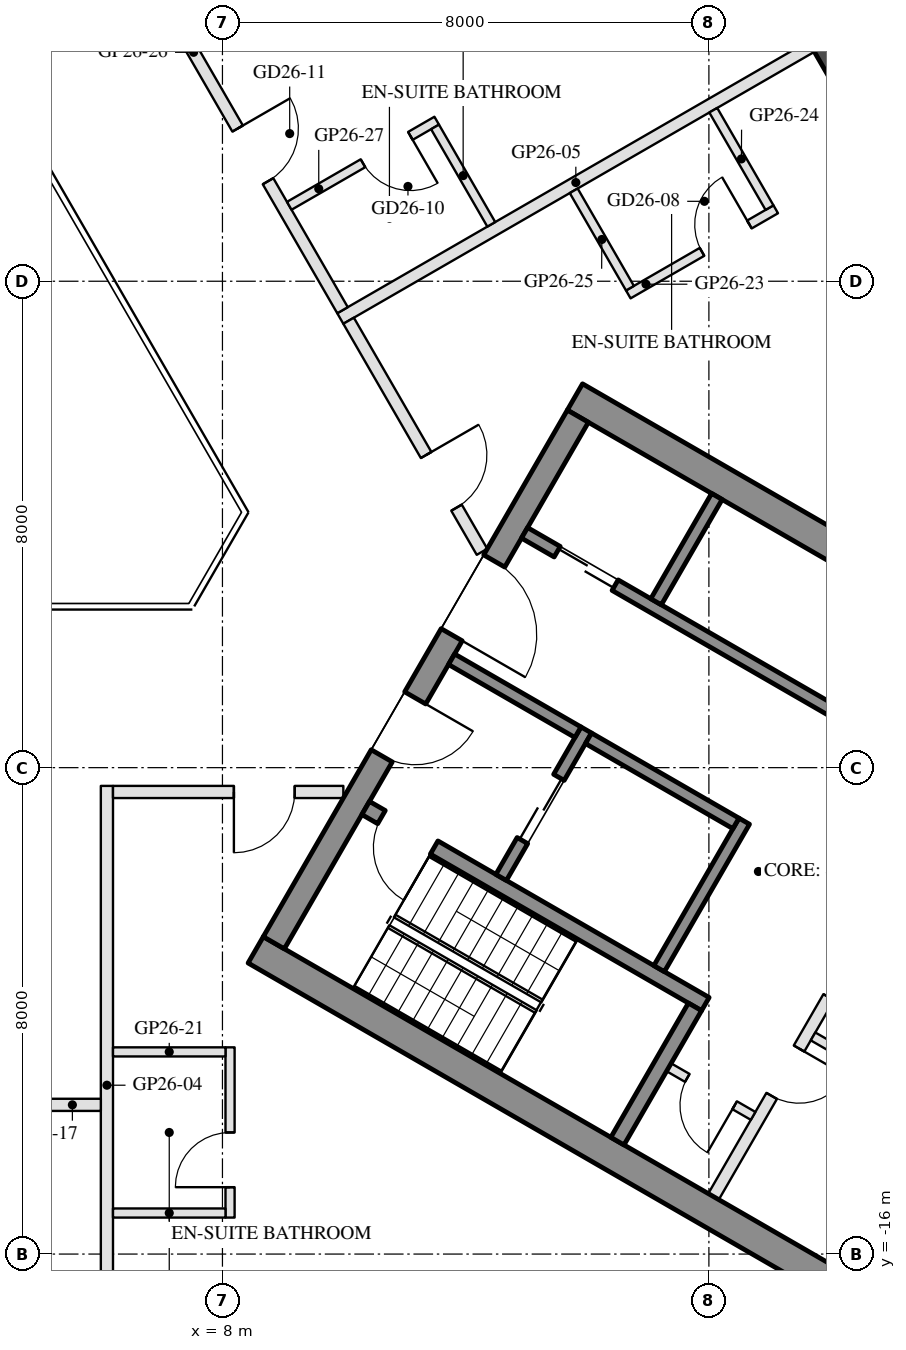
"""IFC4 building model, lengths in metres.
Left out: names, types, materials, properties, quantities, classifications, styles, units other than length and angle.
Written with IfcOpenShell. Run it as: python <this file> out.ifc"""

import sys

from ifc_helpers import new_model, si_unit, direction, frame, frame_2d, origin, place, context, subcontext, project, spatial, rectangle, extrude, element, fill, save


model = new_model("IFC4")
c1 = context("Model", 3, precision=1e-05, world=origin(), true_north=direction((0.0, 1.0)))
c2 = subcontext(c1, "Body", "Model", "MODEL_VIEW")
j1 = project(units=[si_unit("LENGTHUNIT", "METRE"), si_unit("PLANEANGLEUNIT", "RADIAN")], contexts=[c1])
p1 = place(None, origin())
s1 = spatial("IfcSite", under=j1, at=p1, CompositionType="ELEMENT")
p2 = place(p1, origin())
s2 = spatial("IfcBuilding", under=s1, at=p2, CompositionType="ELEMENT")
p3 = place(p2, frame((0.0, 0.0, 272.6)))
s3 = spatial("IfcBuildingStorey", under=s2, at=p3, CompositionType="ELEMENT", Elevation=272.6)
p4 = place(p3, frame((18.519, 2.766, 0.0), z_axis=(0.0, 0.0, 1.0), x_axis=(-0.499995993298, 0.866027717042, 0.0)))
e1 = element("IfcWall", 1, at=p4, inside=s3, PredefinedType="SOLIDWALL", context=c2, shape_type="SweptSolid", body=[
    extrude(rectangle(XDim=6.284, YDim=0.35, at=frame_2d((3.142, 0.0))), origin(), (0.0, 0.0, 1.0), 3.55),
])
p5 = place(p4, frame((1.813, 0.0, 0.0)))
e2 = element("IfcOpeningElement", 2, at=p5, cuts=e1, PredefinedType="OPENING", context=c2, shape_type="SweptSolid", body=[
    extrude(rectangle(XDim=2.4, YDim=2.4, at=frame_2d((1.2, 1.2))), frame((0.0, 0.185, 0.0), z_axis=(0.0, -1.0, 0.0), x_axis=(1.0, 0.0, 0.0)), (0.0, 0.0, 1.0), 0.37),
])
p6 = place(p4, frame((4.513, 0.0, 0.3)))
e3 = element("IfcOpeningElement", 3, at=p6, cuts=e1, PredefinedType="OPENING", context=c2, shape_type="SweptSolid", body=[
    extrude(rectangle(XDim=1.4, YDim=2.65, at=frame_2d((0.7, 1.325))), frame((0.0, 0.185, 0.0), z_axis=(0.0, -1.0, 0.0), x_axis=(1.0, 0.0, 0.0)), (0.0, 0.0, 1.0), 0.37),
])
for number, where, z_axis, x_axis in (
    (4, (8.547, -10.997, 0.0), (0.0, 0.0, 1.0), (0.866, -0.5, 0.0)),
    (5, (13.797, -1.903, 0.0), (0.0, 0.0, 1.0), (0.866, -0.5, 0.0)),
):
    element("IfcWall", number, at=place(p3, frame(where, z_axis=z_axis, x_axis=x_axis)), inside=s3, PredefinedType="SHEAR", context=c2, shape_type="SweptSolid", body=[
        extrude(rectangle(XDim=13.031, YDim=0.5, at=frame_2d((6.516, 0.0))), origin(), (0.0, 0.0, 1.0), 3.5),
    ])
p7 = place(p3, frame((8.845, -10.88, 0.0), z_axis=(0.0, 0.0, 1.0), x_axis=(0.500004234368, 0.866022959057, 0.0)))
e6 = element("IfcWall", 6, at=p7, inside=s3, PredefinedType="SHEAR", context=c2, shape_type="SweptSolid", body=[
    extrude(rectangle(XDim=10.0, YDim=0.4, at=frame_2d((5.0, 0.0))), origin(), (0.0, 0.0, 1.0), 3.5),
])
p8 = place(p7, frame((3.55, 0.0, 0.0)))
e7 = element("IfcOpeningElement", 7, at=p8, cuts=e6, PredefinedType="OPENING", context=c2, shape_type="SweptSolid", body=[
    extrude(rectangle(XDim=1.1, YDim=2.1, at=frame_2d((0.55, 1.05))), frame((0.0, 0.21, 0.0), z_axis=(0.0, -1.0, 0.0), x_axis=(1.0, 0.0, 0.0)), (0.0, 0.0, 1.0), 0.42),
])
p9 = place(p7, frame((5.85, 0.0, 0.0)))
e8 = element("IfcOpeningElement", 8, at=p9, cuts=e6, PredefinedType="OPENING", context=c2, shape_type="SweptSolid", body=[
    extrude(rectangle(XDim=1.4, YDim=2.1, at=frame_2d((0.7, 1.05))), frame((0.0, 0.21, 0.0), z_axis=(0.0, -1.0, 0.0), x_axis=(1.0, 0.0, 0.0)), (0.0, 0.0, 1.0), 0.42),
])
p10 = place(p3, frame((10.356, -8.664, 0.0), z_axis=(0.0, 0.0, 1.0), x_axis=(0.866028629588, -0.499994412703, 0.0)))
e9 = element("IfcWall", 9, at=p10, inside=s3, PredefinedType="SHEAR", context=c2, shape_type="SweptSolid", body=[
    extrude(rectangle(XDim=6.45, YDim=0.25, at=frame_2d((3.225, 0.0))), origin(), (0.0, 0.0, 1.0), 3.5),
])
p11 = place(p10, frame((0.3, 0.0, 0.0)))
e10 = element("IfcOpeningElement", 10, at=p11, cuts=e9, PredefinedType="OPENING", context=c2, shape_type="SweptSolid", body=[
    extrude(rectangle(XDim=1.0, YDim=2.1, at=frame_2d((0.5, 1.05))), frame((0.0, 0.135, 0.0), z_axis=(0.0, -1.0, 0.0), x_axis=(1.0, 0.0, 0.0)), (0.0, 0.0, 1.0), 0.27),
])
p12 = place(p3, frame((14.496, -14.143, 0.0), z_axis=(0.0, 0.0, 1.0), x_axis=(0.500062241894, 0.865989465428, 0.0)))
e11 = element("IfcWall", 11, at=p12, inside=s3, PredefinedType="SHEAR", context=c2, shape_type="SweptSolid", body=[
    extrude(rectangle(XDim=2.55, YDim=0.25, at=frame_2d((1.275, 0.0))), origin(), (0.0, 0.0, 1.0), 3.5),
])
p13 = place(p3, frame((15.181, -11.305, 0.0), z_axis=(0.0, 0.0, 1.0), x_axis=(0.49994636267, 0.866056369097, 0.0)))
e12 = element("IfcWall", 12, at=p13, inside=s3, PredefinedType="SHEAR", context=c2, shape_type="SweptSolid", body=[
    extrude(rectangle(XDim=2.8, YDim=0.2, at=frame_2d((1.4, 0.0))), origin(), (0.0, 0.0, 1.0), 3.5),
])
p14 = place(p3, frame((12.583, -9.805, 0.0), z_axis=(0.0, 0.0, 1.0), x_axis=(0.49994636267, 0.866056369097, 0.0)))
e13 = element("IfcWall", 13, at=p14, inside=s3, PredefinedType="SHEAR", context=c2, shape_type="SweptSolid", body=[
    extrude(rectangle(XDim=2.8, YDim=0.2, at=frame_2d((1.4, 0.0))), origin(), (0.0, 0.0, 1.0), 3.5),
])
p15 = place(p14, frame((0.7, 0.0, 0.0)))
e14 = element("IfcOpeningElement", 14, at=p15, cuts=e13, PredefinedType="OPENING", context=c2, shape_type="SweptSolid", body=[
    extrude(rectangle(XDim=1.2, YDim=2.1, at=frame_2d((0.6, 1.05))), frame((0.0, 0.11, 0.0), z_axis=(0.0, -1.0, 0.0), x_axis=(1.0, 0.0, 0.0)), (0.0, 0.0, 1.0), 0.22),
])
p16 = place(p3, frame((11.768, -6.217, 0.0), z_axis=(0.0, 0.0, 1.0), x_axis=(0.866050077142, -0.499957262057, 0.0)))
e15 = element("IfcWall", 15, at=p16, inside=s3, PredefinedType="SHEAR", context=c2, shape_type="SweptSolid", body=[
    extrude(rectangle(XDim=2.4, YDim=0.2, at=frame_2d((1.2, 0.0))), origin(), (0.0, 0.0, 1.0), 3.5),
])
p17 = place(p3, frame((14.02, -7.517, 0.0), z_axis=(0.0, 0.0, 1.0), x_axis=(0.866034573852, -0.49998411664, 0.0)))
e16 = element("IfcWall", 16, at=p17, inside=s3, PredefinedType="SHEAR", context=c2, shape_type="SweptSolid", body=[
    extrude(rectangle(XDim=2.8, YDim=0.2, at=frame_2d((1.4, 0.0))), origin(), (0.0, 0.0, 1.0), 3.5),
])
p18 = place(p3, frame((12.968, -4.138, 0.0), z_axis=(0.0, 0.0, 1.0), x_axis=(0.866028328073, -0.49999493495, 0.0)))
e17 = element("IfcWall", 17, at=p18, inside=s3, PredefinedType="SHEAR", context=c2, shape_type="SweptSolid", body=[
    extrude(rectangle(XDim=10.16, YDim=0.2, at=frame_2d((5.08, 0.0))), origin(), (0.0, 0.0, 1.0), 3.5),
])
p19 = place(p18, frame((0.62, 0.0, 0.0)))
e18 = element("IfcOpeningElement", 18, at=p19, cuts=e17, PredefinedType="OPENING", context=c2, shape_type="SweptSolid", body=[
    extrude(rectangle(XDim=1.1, YDim=2.1, at=frame_2d((0.55, 1.05))), frame((0.0, 0.11, 0.0), z_axis=(0.0, -1.0, 0.0), x_axis=(1.0, 0.0, 0.0)), (0.0, 0.0, 1.0), 0.22),
])
p20 = place(p18, frame((5.8, 0.0, 0.0)))
e19 = element("IfcOpeningElement", 19, at=p20, cuts=e17, PredefinedType="OPENING", context=c2, shape_type="SweptSolid", body=[
    extrude(rectangle(XDim=0.9, YDim=2.1, at=frame_2d((0.45, 1.05))), frame((0.0, 0.11, 0.0), z_axis=(0.0, -1.0, 0.0), x_axis=(1.0, 0.0, 0.0)), (0.0, 0.0, 1.0), 0.22),
])
p21 = place(p3, frame((15.131, -5.272, 0.0), z_axis=(0.0, 0.0, 1.0), x_axis=(0.499972520799, 0.866041268327, 0.0)))
e20 = element("IfcWall", 20, at=p21, inside=s3, PredefinedType="SHEAR", context=c2, shape_type="SweptSolid", body=[
    extrude(rectangle(XDim=2.0, YDim=0.2, at=frame_2d((1.0, 0.0))), origin(), (0.0, 0.0, 1.0), 3.5),
])
p22 = place(p3, frame((16.076, -15.055, 0.0), z_axis=(0.0, 0.0, 1.0), x_axis=(0.499995103361, 0.866028230842, 0.0)))
e21 = element("IfcWall", 21, at=p22, inside=s3, PredefinedType="PARTITIONING", context=c2, shape_type="SweptSolid", body=[
    extrude(rectangle(XDim=5.4, YDim=0.2, at=frame_2d((2.7, 0.0))), origin(), (0.0, 0.0, 1.0), 3.5),
])
p23 = place(p22, frame((1.913, 0.0, 0.0)))
e22 = element("IfcOpeningElement", 22, at=p23, cuts=e21, PredefinedType="OPENING", context=c2, shape_type="SweptSolid", body=[
    extrude(rectangle(XDim=0.9, YDim=2.1, at=frame_2d((0.45, 1.05))), frame((0.0, 0.11, 0.0), z_axis=(0.0, -1.0, 0.0), x_axis=(1.0, 0.0, 0.0)), (0.0, 0.0, 1.0), 0.22),
])
p24 = place(p22, frame((3.788, 0.0, 0.0)))
e23 = element("IfcOpeningElement", 23, at=p24, cuts=e21, PredefinedType="OPENING", context=c2, shape_type="SweptSolid", body=[
    extrude(rectangle(XDim=0.9, YDim=2.1, at=frame_2d((0.45, 1.05))), frame((0.0, 0.11, 0.0), z_axis=(0.0, -1.0, 0.0), x_axis=(1.0, 0.0, 0.0)), (0.0, 0.0, 1.0), 0.22),
])
p25 = place(p3, frame((15.342, -12.928, 0.0), z_axis=(0.0, 0.0, 1.0), x_axis=(0.865989903783, -0.500061482766, 0.0)))
e24 = element("IfcWall", 24, at=p25, inside=s3, PredefinedType="PARTITIONING", context=c2, shape_type="SweptSolid", body=[
    extrude(rectangle(XDim=1.6, YDim=0.15, at=frame_2d((0.8, 0.0))), origin(), (0.0, 0.0, 1.0), 3.5),
])
p26 = place(p25, frame((0.35, 0.0, 0.0)))
e25 = element("IfcOpeningElement", 25, at=p26, cuts=e24, PredefinedType="OPENING", context=c2, shape_type="SweptSolid", body=[
    extrude(rectangle(XDim=0.9, YDim=2.1, at=frame_2d((0.45, 1.05))), frame((0.0, 0.085, 0.0), z_axis=(0.0, -1.0, 0.0), x_axis=(1.0, 0.0, 0.0)), (0.0, 0.0, 1.0), 0.17),
])
p27 = place(p3, frame((17.713, -12.42, 0.0), z_axis=(0.0, 0.0, 1.0), x_axis=(0.866028878405, -0.499993981732, 0.0)))
e26 = element("IfcWall", 26, at=p27, inside=s3, PredefinedType="PARTITIONING", context=c2, shape_type="SweptSolid", body=[
    extrude(rectangle(XDim=5.292, YDim=0.15, at=frame_2d((2.646, 0.0))), origin(), (0.0, 0.0, 1.0), 3.5),
])
p28 = place(p3, frame((6.1, -18.146, 0.0), z_axis=(0.0, 0.0, 1.0), x_axis=(0.0, 1.0, 0.0)))
e27 = element("IfcWall", 27, at=p28, inside=s3, PredefinedType="PARTITIONING", context=c2, shape_type="SweptSolid", body=[
    extrude(rectangle(XDim=9.846, YDim=0.2, at=frame_2d((4.923, 0.0))), origin(), (0.0, 0.0, 1.0), 3.1),
])
p29 = place(p3, frame((17.685, 3.86, 0.0), z_axis=(0.0, 0.0, 1.0), x_axis=(-0.866026066645, -0.499998851889, 0.0)))
e28 = element("IfcWall", 28, at=p29, inside=s3, PredefinedType="PARTITIONING", context=c2, shape_type="SweptSolid", body=[
    extrude(rectangle(XDim=8.946, YDim=0.2, at=frame_2d((4.473, 0.0))), origin(), (0.0, 0.0, 1.0), 3.1),
])
p30 = place(p3, frame((6.0, -13.546, 0.0), z_axis=(0.0, 0.0, 1.0), x_axis=(-1.0, 0.0, 0.0)))
e29 = element("IfcWall", 29, at=p30, inside=s3, PredefinedType="PARTITIONING", context=c2, shape_type="SweptSolid", body=[
    extrude(rectangle(XDim=3.9, YDim=0.2, at=frame_2d((1.95, 0.0))), origin(), (0.0, 0.0, 1.0), 3.0),
])
p31 = place(p30, frame((1.45, 0.0, 0.0)))
e30 = element("IfcOpeningElement", 30, at=p31, cuts=e29, PredefinedType="OPENING", context=c2, shape_type="SweptSolid", body=[
    extrude(rectangle(XDim=1.0, YDim=2.1, at=frame_2d((0.5, 1.05))), frame((0.0, 0.11, 0.0), z_axis=(0.0, -1.0, 0.0), x_axis=(1.0, 0.0, 0.0)), (0.0, 0.0, 1.0), 0.22),
])
p32 = place(p3, frame((9.988, -8.4, 0.0), z_axis=(0.0, 0.0, 1.0), x_axis=(-1.0, 0.0, 0.0)))
e31 = element("IfcWall", 31, at=p32, inside=s3, PredefinedType="PARTITIONING", context=c2, shape_type="SweptSolid", body=[
    extrude(rectangle(XDim=3.788, YDim=0.2, at=frame_2d((1.894, 0.0))), origin(), (0.0, 0.0, 1.0), 3.0),
])
p33 = place(p32, frame((0.8, 0.0, 0.0)))
e32 = element("IfcOpeningElement", 32, at=p33, cuts=e31, PredefinedType="OPENING", context=c2, shape_type="SweptSolid", body=[
    extrude(rectangle(XDim=1.0, YDim=2.1, at=frame_2d((0.5, 1.05))), frame((0.0, 0.11, 0.0), z_axis=(0.0, -1.0, 0.0), x_axis=(1.0, 0.0, 0.0)), (0.0, 0.0, 1.0), 0.22),
])
p34 = place(p3, frame((8.125, -15.4, 0.0), z_axis=(0.0, 0.0, 1.0), x_axis=(0.0, 1.0, 0.0)))
e33 = element("IfcWall", 33, at=p34, inside=s3, PredefinedType="PARTITIONING", context=c2, shape_type="SweptSolid", body=[
    extrude(rectangle(XDim=2.8, YDim=0.15, at=frame_2d((1.4, 0.0))), origin(), (0.0, 0.0, 1.0), 3.55),
])
p35 = place(p34, frame((0.5, 0.0, 0.0)))
e34 = element("IfcOpeningElement", 34, at=p35, cuts=e33, PredefinedType="OPENING", context=c2, shape_type="SweptSolid", body=[
    extrude(rectangle(XDim=0.9, YDim=2.1, at=frame_2d((0.45, 1.05))), frame((0.0, 0.085, 0.0), z_axis=(0.0, -1.0, 0.0), x_axis=(1.0, 0.0, 0.0)), (0.0, 0.0, 1.0), 0.17),
])
for number, where, z_axis, x_axis in (
    (35, (6.2, -15.325, 0.0), (0.0, 0.0, 1.0), (1.0, 0.0, 0.0)),
    (36, (6.2, -12.675, 0.0), (0.0, 0.0, 1.0), (1.0, 0.0, 0.0)),
):
    element("IfcWall", number, at=place(p3, frame(where, z_axis=z_axis, x_axis=x_axis)), inside=s3, PredefinedType="PARTITIONING", context=c2, shape_type="SweptSolid", body=[
        extrude(rectangle(XDim=1.85, YDim=0.15, at=frame_2d((0.925, 0.0))), origin(), (0.0, 0.0, 1.0), 3.0),
    ])
p36 = place(p3, frame((10.075, -0.65, 0.0), z_axis=(0.0, 0.0, 1.0), x_axis=(0.499998569178, -0.866026229868, 0.0)))
e37 = element("IfcWall", 37, at=p36, inside=s3, PredefinedType="PARTITIONING", context=c2, shape_type="SweptSolid", body=[
    extrude(rectangle(XDim=4.388, YDim=0.2, at=frame_2d((2.194, 0.0))), origin(), (0.0, 0.0, 1.0), 3.0),
])
p37 = place(p36, frame((2.55, 0.0, 0.0)))
e38 = element("IfcOpeningElement", 38, at=p37, cuts=e37, PredefinedType="OPENING", context=c2, shape_type="SweptSolid", body=[
    extrude(rectangle(XDim=1.0, YDim=2.1, at=frame_2d((0.5, 1.05))), frame((0.0, 0.11, 0.0), z_axis=(0.0, -1.0, 0.0), x_axis=(1.0, 0.0, 0.0)), (0.0, 0.0, 1.0), 0.22),
])
p38 = place(p3, frame((14.674, -0.217, 0.0), z_axis=(0.0, 0.0, 1.0), x_axis=(0.866056369097, 0.49994636267, 0.0)))
e39 = element("IfcWall", 39, at=p38, inside=s3, PredefinedType="PARTITIONING", context=c2, shape_type="SweptSolid", body=[
    extrude(rectangle(XDim=2.8, YDim=0.15, at=frame_2d((1.4, 0.0))), origin(), (0.0, 0.0, 1.0), 3.0),
])
p39 = place(p38, frame((1.4, 0.0, 0.0)))
e40 = element("IfcOpeningElement", 40, at=p39, cuts=e39, PredefinedType="OPENING", context=c2, shape_type="SweptSolid", body=[
    extrude(rectangle(XDim=0.9, YDim=2.1, at=frame_2d((0.45, 1.05))), frame((0.0, 0.085, 0.0), z_axis=(0.0, -1.0, 0.0), x_axis=(1.0, 0.0, 0.0)), (0.0, 0.0, 1.0), 0.17),
])
p40 = place(p3, frame((16.997, 1.211, 0.0), z_axis=(0.0, 0.0, 1.0), x_axis=(-0.500042316284, 0.866000971088, 0.0)))
e41 = element("IfcWall", 41, at=p40, inside=s3, PredefinedType="PARTITIONING", context=c2, shape_type="SweptSolid", body=[
    extrude(rectangle(XDim=1.85, YDim=0.15, at=frame_2d((0.925, 0.0))), origin(), (0.0, 0.0, 1.0), 3.0),
])
p41 = place(p3, frame((14.702, -0.115, 0.0), z_axis=(0.0, 0.0, 1.0), x_axis=(-0.499985172903, 0.866033964044, 0.0)))
e42 = element("IfcWall", 42, at=p41, inside=s3, PredefinedType="PARTITIONING", context=c2, shape_type="SweptSolid", body=[
    extrude(rectangle(XDim=1.85, YDim=0.15, at=frame_2d((0.925, 0.0))), origin(), (0.0, 0.0, 1.0), 3.0),
])
p42 = place(p3, frame((6.476, 5.583, 0.0), z_axis=(0.0, 0.0, 1.0), x_axis=(0.499989243959, -0.866031613699, 0.0)))
e43 = element("IfcWall", 43, at=p42, inside=s3, PredefinedType="PARTITIONING", context=c2, shape_type="SweptSolid", body=[
    extrude(rectangle(XDim=6.997, YDim=0.2, at=frame_2d((3.499, 0.0))), origin(), (0.0, 0.0, 1.0), 3.0),
])
p43 = place(p42, frame((3.547, 0.0, 0.0)))
e44 = element("IfcOpeningElement", 44, at=p43, cuts=e43, PredefinedType="OPENING", context=c2, shape_type="SweptSolid", body=[
    extrude(rectangle(XDim=1.0, YDim=2.1, at=frame_2d((0.5, 1.05))), frame((0.0, 0.11, 0.0), z_axis=(0.0, -1.0, 0.0), x_axis=(1.0, 0.0, 0.0)), (0.0, 0.0, 1.0), 0.22),
])
p44 = place(p3, frame((11.524, 2.641, 0.0), z_axis=(0.0, 0.0, 1.0), x_axis=(-0.866018616679, -0.500011755427, 0.0)))
e45 = element("IfcWall", 45, at=p44, inside=s3, PredefinedType="PARTITIONING", context=c2, shape_type="SweptSolid", body=[
    extrude(rectangle(XDim=2.8, YDim=0.15, at=frame_2d((1.4, 0.0))), origin(), (0.0, 0.0, 1.0), 3.55),
])
p45 = place(p44, frame((0.5, 0.0, 0.0)))
e46 = element("IfcOpeningElement", 46, at=p45, cuts=e45, PredefinedType="OPENING", context=c2, shape_type="SweptSolid", body=[
    extrude(rectangle(XDim=0.9, YDim=2.1, at=frame_2d((0.45, 1.05))), frame((0.0, 0.085, 0.0), z_axis=(0.0, -1.0, 0.0), x_axis=(1.0, 0.0, 0.0)), (0.0, 0.0, 1.0), 0.17),
])
p46 = place(p3, frame((12.421, 0.936, 0.0), z_axis=(0.0, 0.0, 1.0), x_axis=(-0.500042316284, 0.866000971088, 0.0)))
e47 = element("IfcWall", 47, at=p46, inside=s3, PredefinedType="PARTITIONING", context=c2, shape_type="SweptSolid", body=[
    extrude(rectangle(XDim=1.85, YDim=0.15, at=frame_2d((0.925, 0.0))), origin(), (0.0, 0.0, 1.0), 3.0),
])
p47 = place(p15, origin())
e48 = element("IfcDoor", 48, at=p47, inside=s3, OperationType="DOUBLE_DOOR_SLIDING", PredefinedType="DOOR", context=c2, shape_type="SweptSolid", body=[
    extrude(rectangle(XDim=1.2, YDim=2.1, at=frame_2d((0.6, 1.05))), frame((0.0, 0.025, 0.0), z_axis=(0.0, -1.0, 0.0), x_axis=(1.0, 0.0, 0.0)), (0.0, 0.0, 1.0), 0.05),
])
fill(e14, e48)
p48 = place(p26, frame((0.9, 0.0, 0.0), z_axis=(0.0, 0.0, 1.0), x_axis=(-1.0, 0.0, 0.0)))
e49 = element("IfcDoor", 49, at=p48, inside=s3, OperationType="SINGLE_SWING_LEFT", PredefinedType="DOOR", context=c2, shape_type="SweptSolid", body=[
    extrude(rectangle(XDim=0.9, YDim=2.1, at=frame_2d((0.45, 1.05))), frame((0.0, 0.025, 0.0), z_axis=(0.0, -1.0, 0.0), x_axis=(1.0, 0.0, 0.0)), (0.0, 0.0, 1.0), 0.05),
])
fill(e25, e49)
p49 = place(p19, origin())
e50 = element("IfcDoor", 50, at=p49, inside=s3, OperationType="DOUBLE_DOOR_SLIDING", PredefinedType="DOOR", context=c2, shape_type="SweptSolid", body=[
    extrude(rectangle(XDim=1.1, YDim=2.1, at=frame_2d((0.55, 1.05))), frame((0.0, 0.025, 0.0), z_axis=(0.0, -1.0, 0.0), x_axis=(1.0, 0.0, 0.0)), (0.0, 0.0, 1.0), 0.05),
])
fill(e18, e50)
p50 = place(p23, frame((0.9, 0.0, 0.0), z_axis=(0.0, 0.0, 1.0), x_axis=(-1.0, 0.0, 0.0)))
e51 = element("IfcDoor", 51, at=p50, inside=s3, OperationType="SINGLE_SWING_LEFT", PredefinedType="DOOR", context=c2, shape_type="SweptSolid", body=[
    extrude(rectangle(XDim=0.9, YDim=2.1, at=frame_2d((0.45, 1.05))), frame((0.0, 0.025, 0.0), z_axis=(0.0, -1.0, 0.0), x_axis=(1.0, 0.0, 0.0)), (0.0, 0.0, 1.0), 0.05),
])
fill(e22, e51)
p51 = place(p8, frame((1.1, 0.0, 0.0), z_axis=(0.0, 0.0, 1.0), x_axis=(-1.0, 0.0, 0.0)))
e52 = element("IfcDoor", 52, at=p51, inside=s3, OperationType="SINGLE_SWING_LEFT", PredefinedType="DOOR", context=c2, shape_type="SweptSolid", body=[
    extrude(rectangle(XDim=1.1, YDim=2.1, at=frame_2d((0.55, 1.05))), frame((0.0, 0.025, 0.0), z_axis=(0.0, -1.0, 0.0), x_axis=(1.0, 0.0, 0.0)), (0.0, 0.0, 1.0), 0.05),
])
fill(e7, e52)
p52 = place(p9, frame((1.4, 0.0, 0.0), z_axis=(0.0, 0.0, 1.0), x_axis=(-1.0, 0.0, 0.0)))
e53 = element("IfcDoor", 53, at=p52, inside=s3, OperationType="DOUBLE_DOOR_SINGLE_SWING", PredefinedType="DOOR", context=c2, shape_type="SweptSolid", body=[
    extrude(rectangle(XDim=1.4, YDim=2.1, at=frame_2d((0.7, 1.05))), frame((0.0, 0.025, 0.0), z_axis=(0.0, -1.0, 0.0), x_axis=(1.0, 0.0, 0.0)), (0.0, 0.0, 1.0), 0.05),
])
fill(e8, e53)
p53 = place(p11, frame((1.0, 0.0, 0.0), z_axis=(0.0, 0.0, 1.0), x_axis=(-1.0, 0.0, 0.0)))
e54 = element("IfcDoor", 54, at=p53, inside=s3, OperationType="SINGLE_SWING_LEFT", PredefinedType="DOOR", context=c2, shape_type="SweptSolid", body=[
    extrude(rectangle(XDim=1.0, YDim=2.1, at=frame_2d((0.5, 1.05))), frame((0.0, 0.025, 0.0), z_axis=(0.0, -1.0, 0.0), x_axis=(1.0, 0.0, 0.0)), (0.0, 0.0, 1.0), 0.05),
])
fill(e10, e54)
p54 = place(p35, origin())
e55 = element("IfcDoor", 55, at=p54, inside=s3, OperationType="SINGLE_SWING_LEFT", PredefinedType="DOOR", context=c2, shape_type="SweptSolid", body=[
    extrude(rectangle(XDim=0.9, YDim=2.1, at=frame_2d((0.45, 1.05))), frame((0.0, 0.025, 0.0), z_axis=(0.0, -1.0, 0.0), x_axis=(1.0, 0.0, 0.0)), (0.0, 0.0, 1.0), 0.05),
])
fill(e34, e55)
p55 = place(p33, origin())
e56 = element("IfcDoor", 56, at=p55, inside=s3, OperationType="SINGLE_SWING_RIGHT", PredefinedType="DOOR", context=c2, shape_type="SweptSolid", body=[
    extrude(rectangle(XDim=1.0, YDim=2.1, at=frame_2d((0.5, 1.05))), frame((0.0, 0.025, 0.0), z_axis=(0.0, -1.0, 0.0), x_axis=(1.0, 0.0, 0.0)), (0.0, 0.0, 1.0), 0.05),
])
fill(e32, e56)
p56 = place(p39, origin())
e57 = element("IfcDoor", 57, at=p56, inside=s3, OperationType="SINGLE_SWING_RIGHT", PredefinedType="DOOR", context=c2, shape_type="SweptSolid", body=[
    extrude(rectangle(XDim=0.9, YDim=2.1, at=frame_2d((0.45, 1.05))), frame((0.0, 0.025, 0.0), z_axis=(0.0, -1.0, 0.0), x_axis=(1.0, 0.0, 0.0)), (0.0, 0.0, 1.0), 0.05),
])
fill(e40, e57)
p57 = place(p37, origin())
e58 = element("IfcDoor", 58, at=p57, inside=s3, OperationType="SINGLE_SWING_LEFT", PredefinedType="DOOR", context=c2, shape_type="SweptSolid", body=[
    extrude(rectangle(XDim=1.0, YDim=2.1, at=frame_2d((0.5, 1.05))), frame((0.0, 0.025, 0.0), z_axis=(0.0, -1.0, 0.0), x_axis=(1.0, 0.0, 0.0)), (0.0, 0.0, 1.0), 0.05),
])
fill(e38, e58)
p58 = place(p45, origin())
e59 = element("IfcDoor", 59, at=p58, inside=s3, OperationType="SINGLE_SWING_LEFT", PredefinedType="DOOR", context=c2, shape_type="SweptSolid", body=[
    extrude(rectangle(XDim=0.9, YDim=2.1, at=frame_2d((0.45, 1.05))), frame((0.0, 0.025, 0.0), z_axis=(0.0, -1.0, 0.0), x_axis=(1.0, 0.0, 0.0)), (0.0, 0.0, 1.0), 0.05),
])
fill(e46, e59)
p59 = place(p43, origin())
e60 = element("IfcDoor", 60, at=p59, inside=s3, OperationType="SINGLE_SWING_LEFT", PredefinedType="DOOR", context=c2, shape_type="SweptSolid", body=[
    extrude(rectangle(XDim=1.0, YDim=2.1, at=frame_2d((0.5, 1.05))), frame((0.0, 0.025, 0.0), z_axis=(0.0, -1.0, 0.0), x_axis=(1.0, 0.0, 0.0)), (0.0, 0.0, 1.0), 0.05),
])
fill(e44, e60)
save(model, sys.argv[1])
